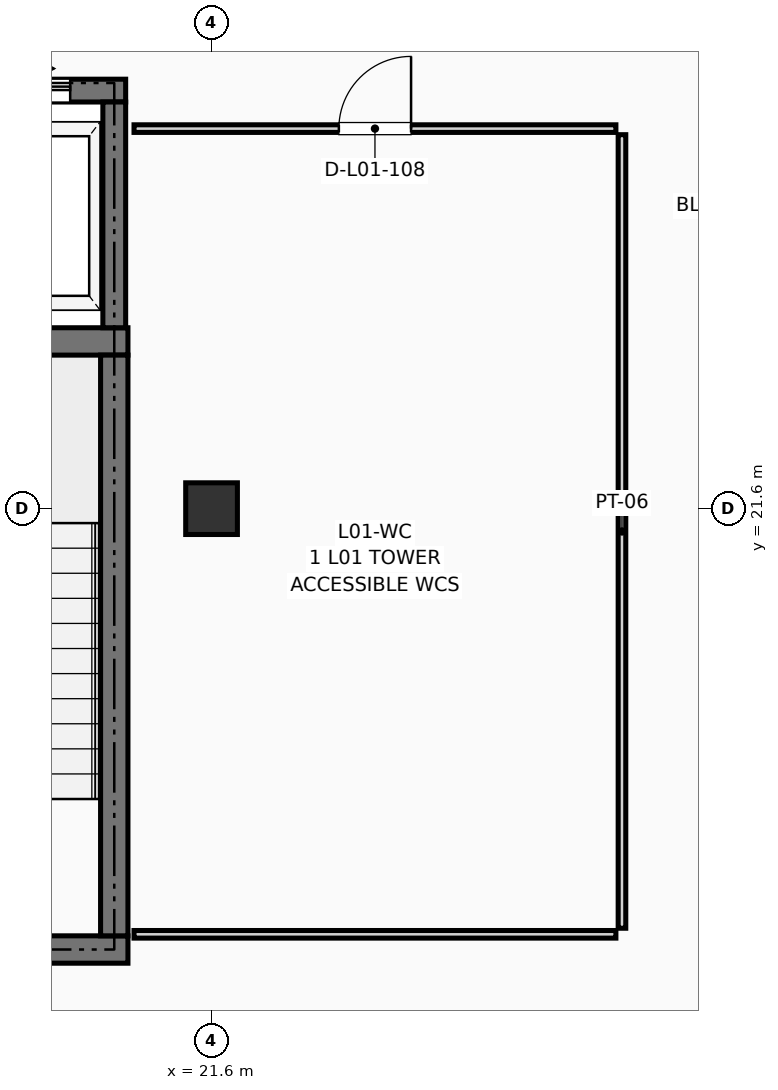
"""IFC4 building model, lengths in metres.
Left out: names, types, materials, properties, quantities, classifications, styles, units other than length and angle.
Written with IfcOpenShell. Run it as: python <this file> out.ifc"""

import sys

from ifc_helpers import new_model, si_unit, direction, frame, frame_2d, origin, origin_2d, place, context, subcontext, project, spatial, rectangle, extrude, element, fill, save


model = new_model("IFC4")
c1 = context("Model", 3, precision=1e-05, world=origin(), true_north=direction((0.0, 1.0)))
c2 = subcontext(c1, "Body", "Model", "MODEL_VIEW")
j1 = project(units=[si_unit("LENGTHUNIT", "METRE"), si_unit("PLANEANGLEUNIT", "RADIAN")], contexts=[c1])
p1 = place(None, origin())
s1 = spatial("IfcSite", under=j1, at=p1, CompositionType="ELEMENT")
p2 = place(p1, origin())
s2 = spatial("IfcBuilding", under=s1, at=p2, CompositionType="ELEMENT")
p3 = place(p2, frame((0.0, 0.0, 4.5)))
s3 = spatial("IfcBuildingStorey", under=s2, at=p3, CompositionType="ELEMENT", Elevation=4.5)
p4 = place(p3, frame((21.6, 21.6, 0.0), z_axis=(0.0, 0.0, 1.0), x_axis=(1.0, 0.0, 0.0)))
e1 = element("IfcColumn", 1, at=p4, inside=s3, PredefinedType="COLUMN", context=c2, shape_type="SweptSolid", body=[
    extrude(rectangle(XDim=0.68, YDim=0.68, at=origin_2d()), origin(), (0.0, 0.0, 1.0), 4.05),
])
for number, where, z_axis, x_axis in (
    (2, (15.62, 15.8, 0.0), (0.0, 0.0, 1.0), (1.0, 0.0, 0.0)),
    (3, (15.62, 23.8, 0.0), (0.0, 0.0, 1.0), (1.0, 0.0, 0.0)),
):
    element("IfcWall", number, at=place(p3, frame(where, z_axis=z_axis, x_axis=x_axis)), inside=s3, PredefinedType="SHEAR", context=c2, shape_type="SweptSolid", body=[
        extrude(rectangle(XDim=4.88, YDim=0.36, at=frame_2d((2.44, 0.0))), origin(), (0.0, 0.0, 1.0), 3.79),
    ])
p5 = place(p3, frame((20.32, 15.98, 0.0), z_axis=(0.0, 0.0, 1.0), x_axis=(0.0, 1.0, 0.0)))
e4 = element("IfcWall", 4, at=p5, inside=s3, PredefinedType="SHEAR", context=c2, shape_type="SweptSolid", body=[
    extrude(rectangle(XDim=7.64, YDim=0.36, at=frame_2d((3.82, 0.0))), origin(), (0.0, 0.0, 1.0), 3.79),
])
p6 = place(p3, frame((17.91, 27.1, 0.0), z_axis=(0.0, 0.0, 1.0), x_axis=(1.0, 0.0, 0.0)))
e5 = element("IfcWall", 5, at=p6, inside=s3, PredefinedType="SHEAR", context=c2, shape_type="SweptSolid", body=[
    extrude(rectangle(XDim=2.56, YDim=0.3, at=frame_2d((1.28, 0.0))), origin(), (0.0, 0.0, 1.0), 3.79),
])
p7 = place(p6, frame((0.73, 0.0, 0.0)))
e6 = element("IfcOpeningElement", 6, at=p7, cuts=e5, PredefinedType="OPENING", context=c2, shape_type="SweptSolid", body=[
    extrude(rectangle(XDim=1.1, YDim=2.2, at=frame_2d((0.55, 1.1))), frame((0.0, 0.162, 0.0), z_axis=(0.0, -1.0, 0.0), x_axis=(1.0, 0.0, 0.0)), (0.0, 0.0, 1.0), 0.324),
])
p8 = place(p3, frame((20.32, 23.98, 0.0), z_axis=(0.0, 0.0, 1.0), x_axis=(0.0, 1.0, 0.0)))
e7 = element("IfcWall", 7, at=p8, inside=s3, PredefinedType="SHEAR", context=c2, shape_type="SweptSolid", body=[
    extrude(rectangle(XDim=2.97, YDim=0.3, at=frame_2d((1.485, 0.0))), origin(), (0.0, 0.0, 1.0), 3.79),
])
p9 = place(p3, frame((20.58, 16.0, 0.0), z_axis=(0.0, 0.0, 1.0), x_axis=(1.0, 0.0, 0.0)))
e8 = element("IfcWall", 8, at=p9, inside=s3, PredefinedType="PARTITIONING", context=c2, shape_type="SweptSolid", body=[
    extrude(rectangle(XDim=6.34, YDim=0.1, at=frame_2d((3.17, 0.0))), origin(), (0.0, 0.0, 1.0), 3.775),
])
p10 = place(p3, frame((27.0, 16.08, 0.0), z_axis=(0.0, 0.0, 1.0), x_axis=(0.0, 1.0, 0.0)))
e9 = element("IfcWall", 9, at=p10, inside=s3, PredefinedType="PARTITIONING", context=c2, shape_type="SweptSolid", body=[
    extrude(rectangle(XDim=10.44, YDim=0.1, at=frame_2d((5.22, 0.0))), origin(), (0.0, 0.0, 1.0), 3.775),
])
p11 = place(p3, frame((20.58, 26.6, 0.0), z_axis=(0.0, 0.0, 1.0), x_axis=(1.0, 0.0, 0.0)))
e10 = element("IfcWall", 10, at=p11, inside=s3, PredefinedType="PARTITIONING", context=c2, shape_type="SweptSolid", body=[
    extrude(rectangle(XDim=6.34, YDim=0.1, at=frame_2d((3.17, 0.0))), origin(), (0.0, 0.0, 1.0), 3.775),
])
p12 = place(p11, frame((2.695, 0.0, 0.0)))
e11 = element("IfcOpeningElement", 11, at=p12, cuts=e10, PredefinedType="OPENING", context=c2, shape_type="SweptSolid", body=[
    extrude(rectangle(XDim=0.95, YDim=2.1, at=frame_2d((0.475, 1.05))), frame((0.0, 0.062, 0.0), z_axis=(0.0, -1.0, 0.0), x_axis=(1.0, 0.0, 0.0)), (0.0, 0.0, 1.0), 0.124),
])
p13 = place(p7, origin())
e12 = element("IfcDoor", 12, at=p13, inside=s3, OperationType="DOUBLE_DOOR_SLIDING", PredefinedType="DOOR", context=c2, shape_type="SweptSolid", body=[
    extrude(rectangle(XDim=1.1, YDim=2.2, at=frame_2d((0.55, 1.1))), frame((0.0, 0.025, 0.0), z_axis=(0.0, -1.0, 0.0), x_axis=(1.0, 0.0, 0.0)), (0.0, 0.0, 1.0), 0.05),
])
fill(e6, e12)
p14 = place(p12, origin())
e13 = element("IfcDoor", 13, at=p14, inside=s3, OperationType="SINGLE_SWING_RIGHT", PredefinedType="DOOR", context=c2, shape_type="SweptSolid", body=[
    extrude(rectangle(XDim=0.95, YDim=2.1, at=frame_2d((0.475, 1.05))), frame((0.0, 0.025, 0.0), z_axis=(0.0, -1.0, 0.0), x_axis=(1.0, 0.0, 0.0)), (0.0, 0.0, 1.0), 0.05),
])
fill(e11, e13)
save(model, sys.argv[1])
